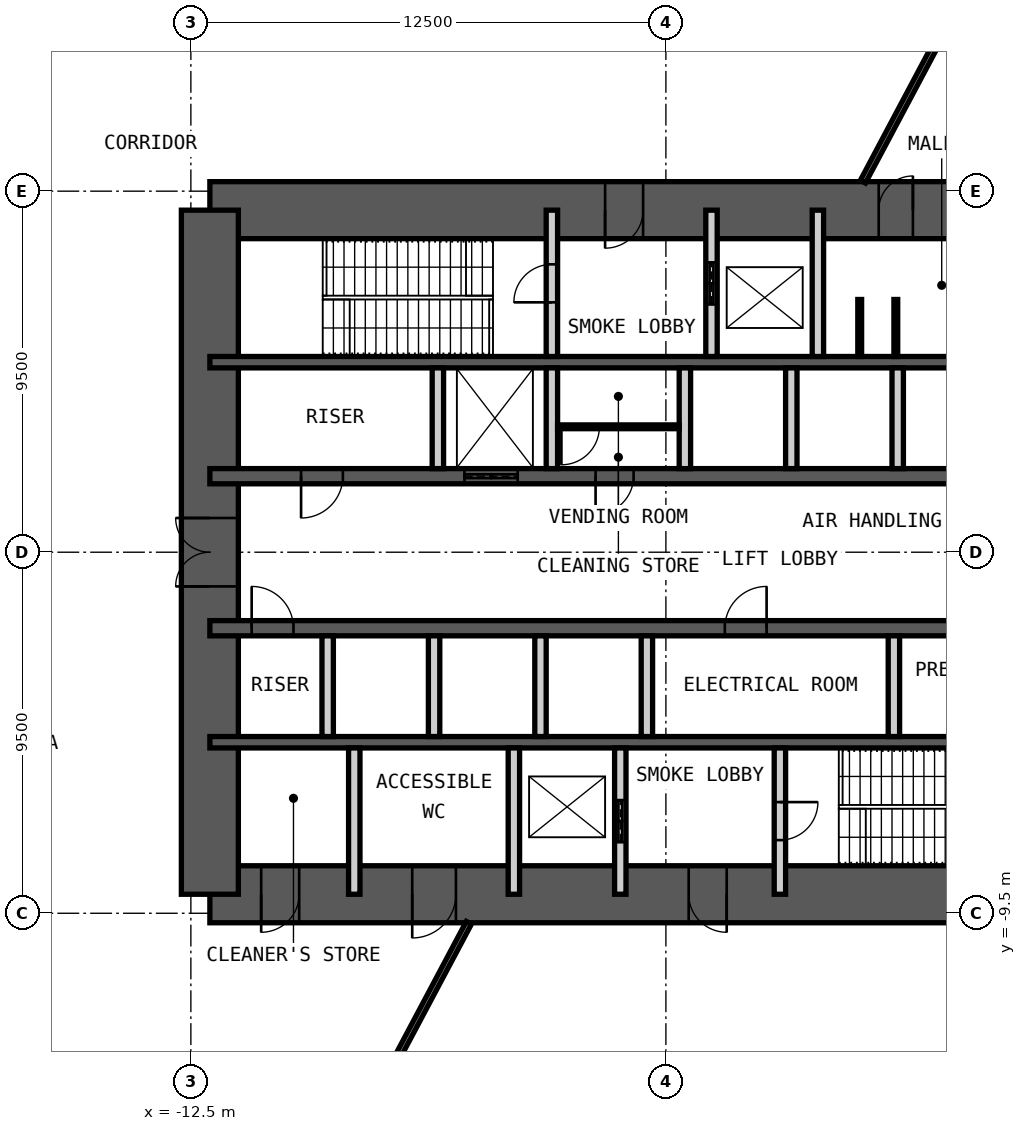
"""IFC4 building model, lengths in metres.
Left out: names, types, materials, properties, quantities, classifications, styles, units other than length and angle.
Written with IfcOpenShell. Run it as: python <this file> out.ifc"""

import sys

from ifc_helpers import new_model, si_unit, direction, frame, frame_2d, origin, place, context, subcontext, project, spatial, rectangle, extrude, element, fill, save


model = new_model("IFC4")
c1 = context("Model", 3, precision=1e-05, world=origin(), true_north=direction((0.0, 1.0)))
c2 = subcontext(c1, "Body", "Model", "MODEL_VIEW")
j1 = project(units=[si_unit("LENGTHUNIT", "METRE"), si_unit("PLANEANGLEUNIT", "RADIAN")], contexts=[c1])
p1 = place(None, origin())
s1 = spatial("IfcSite", under=j1, at=p1, CompositionType="ELEMENT")
p2 = place(p1, origin())
s2 = spatial("IfcBuilding", under=s1, at=p2, CompositionType="ELEMENT")
p3 = place(p2, frame((0.0, 0.0, -6.0)))
s3 = spatial("IfcBuildingStorey", under=s2, at=p3, CompositionType="ELEMENT", Elevation=-6.0)
p4 = place(p3, frame((-12.0, 9.0, 0.0), z_axis=(0.0, 0.0, 1.0), x_axis=(1.0, 0.0, 0.0)))
e1 = element("IfcWall", 1, at=p4, inside=s3, PredefinedType="SHEAR", context=c2, shape_type="SweptSolid", body=[
    extrude(rectangle(XDim=24.0, YDim=1.5, at=frame_2d((12.0, 0.0))), origin(), (0.0, 0.0, 1.0), 6.0),
])
p5 = place(p4, frame((10.4, 0.0, 0.0)))
e2 = element("IfcOpeningElement", 2, at=p5, cuts=e1, PredefinedType="OPENING", context=c2, shape_type="SweptSolid", body=[
    extrude(rectangle(XDim=1.0, YDim=2.1, at=frame_2d((0.5, 1.05))), frame((0.0, 0.76, 0.0), z_axis=(0.0, -1.0, 0.0), x_axis=(1.0, 0.0, 0.0)), (0.0, 0.0, 1.0), 1.52),
])
p6 = place(p4, frame((17.6, 0.0, 0.0)))
e3 = element("IfcOpeningElement", 3, at=p6, cuts=e1, PredefinedType="OPENING", context=c2, shape_type="SweptSolid", body=[
    extrude(rectangle(XDim=0.9, YDim=2.1, at=frame_2d((0.45, 1.05))), frame((0.0, 0.76, 0.0), z_axis=(0.0, -1.0, 0.0), x_axis=(1.0, 0.0, 0.0)), (0.0, 0.0, 1.0), 1.52),
])
p7 = place(p4, frame((21.9, 0.0, 0.0)))
e4 = element("IfcOpeningElement", 4, at=p7, cuts=e1, PredefinedType="OPENING", context=c2, shape_type="SweptSolid", body=[
    extrude(rectangle(XDim=0.9, YDim=2.1, at=frame_2d((0.45, 1.05))), frame((0.0, 0.76, 0.0), z_axis=(0.0, -1.0, 0.0), x_axis=(1.0, 0.0, 0.0)), (0.0, 0.0, 1.0), 1.52),
])
p8 = place(p3, frame((-12.0, -9.0, 0.0), z_axis=(0.0, 0.0, 1.0), x_axis=(1.0, 0.0, 0.0)))
e5 = element("IfcWall", 5, at=p8, inside=s3, PredefinedType="SHEAR", context=c2, shape_type="SweptSolid", body=[
    extrude(rectangle(XDim=24.0, YDim=1.5, at=frame_2d((12.0, 0.0))), origin(), (0.0, 0.0, 1.0), 6.0),
])
p9 = place(p8, frame((1.35, 0.0, 0.0)))
e6 = element("IfcOpeningElement", 6, at=p9, cuts=e5, PredefinedType="OPENING", context=c2, shape_type="SweptSolid", body=[
    extrude(rectangle(XDim=1.0, YDim=2.1, at=frame_2d((0.5, 1.05))), frame((0.0, 0.76, 0.0), z_axis=(0.0, -1.0, 0.0), x_axis=(1.0, 0.0, 0.0)), (0.0, 0.0, 1.0), 1.52),
])
p10 = place(p8, frame((5.325, 0.0, 0.0)))
e7 = element("IfcOpeningElement", 7, at=p10, cuts=e5, PredefinedType="OPENING", context=c2, shape_type="SweptSolid", body=[
    extrude(rectangle(XDim=1.15, YDim=2.1, at=frame_2d((0.575, 1.05))), frame((0.0, 0.76, 0.0), z_axis=(0.0, -1.0, 0.0), x_axis=(1.0, 0.0, 0.0)), (0.0, 0.0, 1.0), 1.52),
])
p11 = place(p8, frame((12.6, 0.0, 0.0)))
e8 = element("IfcOpeningElement", 8, at=p11, cuts=e5, PredefinedType="OPENING", context=c2, shape_type="SweptSolid", body=[
    extrude(rectangle(XDim=1.0, YDim=2.1, at=frame_2d((0.5, 1.05))), frame((0.0, 0.76, 0.0), z_axis=(0.0, -1.0, 0.0), x_axis=(1.0, 0.0, 0.0)), (0.0, 0.0, 1.0), 1.52),
])
p12 = place(p3, frame((-12.0, -9.0, 0.0), z_axis=(0.0, 0.0, 1.0), x_axis=(0.0, 1.0, 0.0)))
e9 = element("IfcWall", 9, at=p12, inside=s3, PredefinedType="SHEAR", context=c2, shape_type="SweptSolid", body=[
    extrude(rectangle(XDim=18.0, YDim=1.5, at=frame_2d((9.0, 0.0))), origin(), (0.0, 0.0, 1.0), 6.0),
])
p13 = place(p12, frame((8.1, 0.0, 0.0)))
e10 = element("IfcOpeningElement", 10, at=p13, cuts=e9, PredefinedType="OPENING", context=c2, shape_type="SweptSolid", body=[
    extrude(rectangle(XDim=1.8, YDim=2.1, at=frame_2d((0.9, 1.05))), frame((0.0, 0.76, 0.0), z_axis=(0.0, -1.0, 0.0), x_axis=(1.0, 0.0, 0.0)), (0.0, 0.0, 1.0), 1.52),
])
p14 = place(p3, frame((-12.0, 5.0, 0.0), z_axis=(0.0, 0.0, 1.0), x_axis=(1.0, 0.0, 0.0)))
e11 = element("IfcWall", 11, at=p14, inside=s3, PredefinedType="SHEAR", context=c2, shape_type="SweptSolid", body=[
    extrude(rectangle(XDim=24.0, YDim=0.3, at=frame_2d((12.0, 0.0))), origin(), (0.0, 0.0, 1.0), 6.0),
])
p15 = place(p3, frame((-12.0, 2.0, 0.0), z_axis=(0.0, 0.0, 1.0), x_axis=(1.0, 0.0, 0.0)))
e12 = element("IfcWall", 12, at=p15, inside=s3, PredefinedType="SHEAR", context=c2, shape_type="SweptSolid", body=[
    extrude(rectangle(XDim=24.0, YDim=0.4, at=frame_2d((12.0, 0.0))), origin(), (0.0, 0.0, 1.0), 6.0),
])
p16 = place(p15, frame((2.4, 0.0, 0.0)))
e13 = element("IfcOpeningElement", 13, at=p16, cuts=e12, PredefinedType="OPENING", context=c2, shape_type="SweptSolid", body=[
    extrude(rectangle(XDim=1.1, YDim=2.1, at=frame_2d((0.55, 1.05))), frame((0.0, 0.21, 0.0), z_axis=(0.0, -1.0, 0.0), x_axis=(1.0, 0.0, 0.0)), (0.0, 0.0, 1.0), 0.42),
])
p17 = place(p15, frame((22.0, 0.0, 0.0)))
e14 = element("IfcOpeningElement", 14, at=p17, cuts=e12, PredefinedType="OPENING", context=c2, shape_type="SweptSolid", body=[
    extrude(rectangle(XDim=1.1, YDim=2.1, at=frame_2d((0.55, 1.05))), frame((0.0, 0.21, 0.0), z_axis=(0.0, -1.0, 0.0), x_axis=(1.0, 0.0, 0.0)), (0.0, 0.0, 1.0), 0.42),
])
p18 = place(p15, frame((10.15, 0.0, 0.0)))
e15 = element("IfcOpeningElement", 15, at=p18, cuts=e12, PredefinedType="OPENING", context=c2, shape_type="SweptSolid", body=[
    extrude(rectangle(XDim=1.0, YDim=2.1, at=frame_2d((0.5, 1.05))), frame((0.0, 0.21, 0.0), z_axis=(0.0, -1.0, 0.0), x_axis=(1.0, 0.0, 0.0)), (0.0, 0.0, 1.0), 0.42),
])
p19 = place(p15, frame((6.7, 0.0, 0.0)))
e16 = element("IfcOpeningElement", 16, at=p19, cuts=e12, PredefinedType="OPENING", context=c2, shape_type="SweptSolid", body=[
    extrude(rectangle(XDim=1.4, YDim=2.4, at=frame_2d((0.7, 1.2))), frame((0.0, 0.21, 0.0), z_axis=(0.0, -1.0, 0.0), x_axis=(1.0, 0.0, 0.0)), (0.0, 0.0, 1.0), 0.42),
])
p20 = place(p3, frame((-12.0, -2.0, 0.0), z_axis=(0.0, 0.0, 1.0), x_axis=(1.0, 0.0, 0.0)))
e17 = element("IfcWall", 17, at=p20, inside=s3, PredefinedType="SHEAR", context=c2, shape_type="SweptSolid", body=[
    extrude(rectangle(XDim=24.0, YDim=0.4, at=frame_2d((12.0, 0.0))), origin(), (0.0, 0.0, 1.0), 6.0),
])
p21 = place(p20, frame((1.1, 0.0, 0.0)))
e18 = element("IfcOpeningElement", 18, at=p21, cuts=e17, PredefinedType="OPENING", context=c2, shape_type="SweptSolid", body=[
    extrude(rectangle(XDim=1.1, YDim=2.1, at=frame_2d((0.55, 1.05))), frame((0.0, 0.21, 0.0), z_axis=(0.0, -1.0, 0.0), x_axis=(1.0, 0.0, 0.0)), (0.0, 0.0, 1.0), 0.42),
])
p22 = place(p20, frame((13.55, 0.0, 0.0)))
e19 = element("IfcOpeningElement", 19, at=p22, cuts=e17, PredefinedType="OPENING", context=c2, shape_type="SweptSolid", body=[
    extrude(rectangle(XDim=1.1, YDim=2.1, at=frame_2d((0.55, 1.05))), frame((0.0, 0.21, 0.0), z_axis=(0.0, -1.0, 0.0), x_axis=(1.0, 0.0, 0.0)), (0.0, 0.0, 1.0), 0.42),
])
p23 = place(p20, frame((20.7, 0.0, 0.0)))
e20 = element("IfcOpeningElement", 20, at=p23, cuts=e17, PredefinedType="OPENING", context=c2, shape_type="SweptSolid", body=[
    extrude(rectangle(XDim=1.1, YDim=2.1, at=frame_2d((0.55, 1.05))), frame((0.0, 0.21, 0.0), z_axis=(0.0, -1.0, 0.0), x_axis=(1.0, 0.0, 0.0)), (0.0, 0.0, 1.0), 0.42),
])
p24 = place(p3, frame((-12.0, -5.0, 0.0), z_axis=(0.0, 0.0, 1.0), x_axis=(1.0, 0.0, 0.0)))
e21 = element("IfcWall", 21, at=p24, inside=s3, PredefinedType="SHEAR", context=c2, shape_type="SweptSolid", body=[
    extrude(rectangle(XDim=24.0, YDim=0.3, at=frame_2d((12.0, 0.0))), origin(), (0.0, 0.0, 1.0), 6.0),
])
p25 = place(p3, frame((-3.0, 5.15, 0.0), z_axis=(0.0, 0.0, 1.0), x_axis=(0.0, 1.0, 0.0)))
e22 = element("IfcWall", 22, at=p25, inside=s3, PredefinedType="PARTITIONING", context=c2, shape_type="SweptSolid", body=[
    extrude(rectangle(XDim=3.85, YDim=0.3, at=frame_2d((1.925, 0.0))), origin(), (0.0, 0.0, 1.0), 5.78),
])
p26 = place(p25, frame((1.425, 0.0, 0.0)))
e23 = element("IfcOpeningElement", 23, at=p26, cuts=e22, PredefinedType="OPENING", context=c2, shape_type="SweptSolid", body=[
    extrude(rectangle(XDim=1.0, YDim=2.1, at=frame_2d((0.5, 1.05))), frame((0.0, 0.16, 0.0), z_axis=(0.0, -1.0, 0.0), x_axis=(1.0, 0.0, 0.0)), (0.0, 0.0, 1.0), 0.32),
])
p27 = place(p3, frame((1.2, 5.15, 0.0), z_axis=(0.0, 0.0, 1.0), x_axis=(0.0, 1.0, 0.0)))
e24 = element("IfcWall", 24, at=p27, inside=s3, PredefinedType="PARTITIONING", context=c2, shape_type="SweptSolid", body=[
    extrude(rectangle(XDim=3.85, YDim=0.3, at=frame_2d((1.925, 0.0))), origin(), (0.0, 0.0, 1.0), 5.78),
])
p28 = place(p27, frame((1.375, 0.0, 0.0)))
e25 = element("IfcOpeningElement", 25, at=p28, cuts=e24, PredefinedType="OPENING", context=c2, shape_type="SweptSolid", body=[
    extrude(rectangle(XDim=1.1, YDim=2.4, at=frame_2d((0.55, 1.2))), frame((0.0, 0.16, 0.0), z_axis=(0.0, -1.0, 0.0), x_axis=(1.0, 0.0, 0.0)), (0.0, 0.0, 1.0), 0.32),
])
p29 = place(p3, frame((4.0, 5.15, 0.0), z_axis=(0.0, 0.0, 1.0), x_axis=(0.0, 1.0, 0.0)))
e26 = element("IfcWall", 26, at=p29, inside=s3, PredefinedType="PARTITIONING", context=c2, shape_type="SweptSolid", body=[
    extrude(rectangle(XDim=3.85, YDim=0.3, at=frame_2d((1.925, 0.0))), origin(), (0.0, 0.0, 1.0), 5.78),
])
for number, where, z_axis, x_axis in (
    (27, (-6.0, 2.2, 0.0), (0.0, 0.0, 1.0), (0.0, 1.0, 0.0)),
    (28, (-3.0, 2.2, 0.0), (0.0, 0.0, 1.0), (0.0, 1.0, 0.0)),
    (29, (0.5, 2.2, 0.0), (0.0, 0.0, 1.0), (0.0, 1.0, 0.0)),
    (30, (3.3, 2.2, 0.0), (0.0, 0.0, 1.0), (0.0, 1.0, 0.0)),
    (31, (6.1, 2.2, 0.0), (0.0, 0.0, 1.0), (0.0, 1.0, 0.0)),
    (32, (-8.9, -4.85, 0.0), (0.0, 0.0, 1.0), (0.0, 1.0, 0.0)),
    (33, (-6.1, -4.85, 0.0), (0.0, 0.0, 1.0), (0.0, 1.0, 0.0)),
    (34, (-3.3, -4.85, 0.0), (0.0, 0.0, 1.0), (0.0, 1.0, 0.0)),
    (35, (-0.5, -4.85, 0.0), (0.0, 0.0, 1.0), (0.0, 1.0, 0.0)),
    (36, (6.0, -4.85, 0.0), (0.0, 0.0, 1.0), (0.0, 1.0, 0.0)),
):
    element("IfcWall", number, at=place(p3, frame(where, z_axis=z_axis, x_axis=x_axis)), inside=s3, PredefinedType="PARTITIONING", context=c2, shape_type="SweptSolid", body=[
        extrude(rectangle(XDim=2.65, YDim=0.3, at=frame_2d((1.325, 0.0))), origin(), (0.0, 0.0, 1.0), 5.78),
    ])
for number, where, z_axis, x_axis in (
    (37, (-8.2, -9.0, 0.0), (0.0, 0.0, 1.0), (0.0, 1.0, 0.0)),
    (38, (-4.0, -9.0, 0.0), (0.0, 0.0, 1.0), (0.0, 1.0, 0.0)),
):
    element("IfcWall", number, at=place(p3, frame(where, z_axis=z_axis, x_axis=x_axis)), inside=s3, PredefinedType="PARTITIONING", context=c2, shape_type="SweptSolid", body=[
        extrude(rectangle(XDim=3.85, YDim=0.3, at=frame_2d((1.925, 0.0))), origin(), (0.0, 0.0, 1.0), 5.78),
    ])
p30 = place(p3, frame((-1.2, -9.0, 0.0), z_axis=(0.0, 0.0, 1.0), x_axis=(0.0, 1.0, 0.0)))
e39 = element("IfcWall", 39, at=p30, inside=s3, PredefinedType="PARTITIONING", context=c2, shape_type="SweptSolid", body=[
    extrude(rectangle(XDim=3.85, YDim=0.3, at=frame_2d((1.925, 0.0))), origin(), (0.0, 0.0, 1.0), 5.78),
])
p31 = place(p30, frame((1.375, 0.0, 0.0)))
e40 = element("IfcOpeningElement", 40, at=p31, cuts=e39, PredefinedType="OPENING", context=c2, shape_type="SweptSolid", body=[
    extrude(rectangle(XDim=1.1, YDim=2.4, at=frame_2d((0.55, 1.2))), frame((0.0, 0.16, 0.0), z_axis=(0.0, -1.0, 0.0), x_axis=(1.0, 0.0, 0.0)), (0.0, 0.0, 1.0), 0.32),
])
p32 = place(p3, frame((3.0, -9.0, 0.0), z_axis=(0.0, 0.0, 1.0), x_axis=(0.0, 1.0, 0.0)))
e41 = element("IfcWall", 41, at=p32, inside=s3, PredefinedType="PARTITIONING", context=c2, shape_type="SweptSolid", body=[
    extrude(rectangle(XDim=3.85, YDim=0.3, at=frame_2d((1.925, 0.0))), origin(), (0.0, 0.0, 1.0), 5.78),
])
p33 = place(p32, frame((1.425, 0.0, 0.0)))
e42 = element("IfcOpeningElement", 42, at=p33, cuts=e41, PredefinedType="OPENING", context=c2, shape_type="SweptSolid", body=[
    extrude(rectangle(XDim=1.0, YDim=2.1, at=frame_2d((0.5, 1.05))), frame((0.0, 0.16, 0.0), z_axis=(0.0, -1.0, 0.0), x_axis=(1.0, 0.0, 0.0)), (0.0, 0.0, 1.0), 0.32),
])
p34 = place(p3, frame((-2.85, 3.3, 0.0), z_axis=(0.0, 0.0, 1.0), x_axis=(1.0, 0.0, 0.0)))
e43 = element("IfcWall", 43, at=p34, inside=s3, PredefinedType="PARTITIONING", context=c2, shape_type="SweptSolid", body=[
    extrude(rectangle(XDim=3.2, YDim=0.1, at=frame_2d((1.6, 0.0))), origin(), (0.0, 0.0, 1.0), 5.78),
])
p35 = place(p34, frame((0.1, 0.0, 0.0)))
e44 = element("IfcOpeningElement", 44, at=p35, cuts=e43, PredefinedType="OPENING", context=c2, shape_type="SweptSolid", body=[
    extrude(rectangle(XDim=1.0, YDim=2.4, at=frame_2d((0.5, 1.2))), frame((0.0, 0.06, 0.0), z_axis=(0.0, -1.0, 0.0), x_axis=(1.0, 0.0, 0.0)), (0.0, 0.0, 1.0), 0.12),
])
for number, where, z_axis, x_axis in (
    (45, (5.1, 5.15, 0.0), (0.0, 0.0, 1.0), (0.0, 1.0, 0.0)),
    (46, (6.05, 5.15, 0.0), (0.0, 0.0, 1.0), (0.0, 1.0, 0.0)),
):
    element("IfcWall", number, at=place(p3, frame(where, z_axis=z_axis, x_axis=x_axis)), inside=s3, PredefinedType="PARTITIONING", context=c2, shape_type="SweptSolid", body=[
        extrude(rectangle(XDim=1.5, YDim=0.1, at=frame_2d((0.75, 0.0))), origin(), (0.0, 0.0, 1.0), 2.1),
    ])
p36 = place(p3, frame((-16.105, -20.705, 0.0), z_axis=(0.0, 0.0, 1.0), x_axis=(-0.500004511595, 0.866022798998, 0.0)))
e47 = element("IfcWall", 47, at=p36, inside=s3, PredefinedType="PARTITIONING", context=c2, shape_type="SweptSolid", body=[
    extrude(rectangle(XDim=16.683, YDim=0.15, at=frame_2d((8.342, 0.0))), origin(), (0.0, 0.0, 1.0), 5.75),
])
p37 = place(p36, frame((7.442, 0.0, 0.0)))
e48 = element("IfcOpeningElement", 48, at=p37, cuts=e47, PredefinedType="OPENING", context=c2, shape_type="SweptSolid", body=[
    extrude(rectangle(XDim=1.8, YDim=2.4, at=frame_2d((0.9, 1.2))), frame((0.0, 0.085, 0.0), z_axis=(0.0, -1.0, 0.0), x_axis=(1.0, 0.0, 0.0)), (0.0, 0.0, 1.0), 0.17),
])
p38 = place(p3, frame((5.184, 9.75, 0.0), z_axis=(0.0, 0.0, 1.0), x_axis=(0.469471208528, 0.882947781221, 0.0)))
e49 = element("IfcWall", 49, at=p38, inside=s3, PredefinedType="PARTITIONING", context=c2, shape_type="SweptSolid", body=[
    extrude(rectangle(XDim=26.134, YDim=0.15, at=frame_2d((13.067, 0.0))), origin(), (0.0, 0.0, 1.0), 5.75),
])
p39 = place(p38, frame((12.167, 0.0, 0.0)))
e50 = element("IfcOpeningElement", 50, at=p39, cuts=e49, PredefinedType="OPENING", context=c2, shape_type="SweptSolid", body=[
    extrude(rectangle(XDim=1.8, YDim=2.4, at=frame_2d((0.9, 1.2))), frame((0.0, 0.085, 0.0), z_axis=(0.0, -1.0, 0.0), x_axis=(1.0, 0.0, 0.0)), (0.0, 0.0, 1.0), 0.17),
])
p40 = place(p3, frame((-5.184, -9.75, 0.0), z_axis=(0.0, 0.0, 1.0), x_axis=(-0.469470342993, -0.882948241433, 0.0)))
e51 = element("IfcWall", 51, at=p40, inside=s3, PredefinedType="PARTITIONING", context=c2, shape_type="SweptSolid", body=[
    extrude(rectangle(XDim=27.565, YDim=0.15, at=frame_2d((13.783, 0.0))), origin(), (0.0, 0.0, 1.0), 5.75),
])
p41 = place(p40, frame((12.883, 0.0, 0.0)))
e52 = element("IfcOpeningElement", 52, at=p41, cuts=e51, PredefinedType="OPENING", context=c2, shape_type="SweptSolid", body=[
    extrude(rectangle(XDim=1.8, YDim=2.4, at=frame_2d((0.9, 1.2))), frame((0.0, 0.085, 0.0), z_axis=(0.0, -1.0, 0.0), x_axis=(1.0, 0.0, 0.0)), (0.0, 0.0, 1.0), 0.17),
])
p42 = place(p5, origin())
e53 = element("IfcDoor", 53, at=p42, inside=s3, OperationType="SINGLE_SWING_LEFT", PredefinedType="DOOR", context=c2, shape_type="SweptSolid", body=[
    extrude(rectangle(XDim=1.0, YDim=2.1, at=frame_2d((0.5, 1.05))), frame((0.0, 0.025, 0.0), z_axis=(0.0, -1.0, 0.0), x_axis=(1.0, 0.0, 0.0)), (0.0, 0.0, 1.0), 0.05),
])
fill(e2, e53)
p43 = place(p6, origin())
e54 = element("IfcDoor", 54, at=p43, inside=s3, OperationType="SINGLE_SWING_LEFT", PredefinedType="DOOR", context=c2, shape_type="SweptSolid", body=[
    extrude(rectangle(XDim=0.9, YDim=2.1, at=frame_2d((0.45, 1.05))), frame((0.0, 0.025, 0.0), z_axis=(0.0, -1.0, 0.0), x_axis=(1.0, 0.0, 0.0)), (0.0, 0.0, 1.0), 0.05),
])
fill(e3, e54)
p44 = place(p9, origin())
e55 = element("IfcDoor", 55, at=p44, inside=s3, OperationType="SINGLE_SWING_LEFT", PredefinedType="DOOR", context=c2, shape_type="SweptSolid", body=[
    extrude(rectangle(XDim=1.0, YDim=2.1, at=frame_2d((0.5, 1.05))), frame((0.0, 0.025, 0.0), z_axis=(0.0, -1.0, 0.0), x_axis=(1.0, 0.0, 0.0)), (0.0, 0.0, 1.0), 0.05),
])
fill(e6, e55)
p45 = place(p10, origin())
e56 = element("IfcDoor", 56, at=p45, inside=s3, OperationType="SINGLE_SWING_LEFT", PredefinedType="DOOR", context=c2, shape_type="SweptSolid", body=[
    extrude(rectangle(XDim=1.15, YDim=2.1, at=frame_2d((0.575, 1.05))), frame((0.0, 0.025, 0.0), z_axis=(0.0, -1.0, 0.0), x_axis=(1.0, 0.0, 0.0)), (0.0, 0.0, 1.0), 0.05),
])
fill(e7, e56)
p46 = place(p11, origin())
e57 = element("IfcDoor", 57, at=p46, inside=s3, OperationType="SINGLE_SWING_RIGHT", PredefinedType="DOOR", context=c2, shape_type="SweptSolid", body=[
    extrude(rectangle(XDim=1.0, YDim=2.1, at=frame_2d((0.5, 1.05))), frame((0.0, 0.025, 0.0), z_axis=(0.0, -1.0, 0.0), x_axis=(1.0, 0.0, 0.0)), (0.0, 0.0, 1.0), 0.05),
])
fill(e8, e57)
p47 = place(p26, origin())
e58 = element("IfcDoor", 58, at=p47, inside=s3, OperationType="SINGLE_SWING_RIGHT", PredefinedType="DOOR", context=c2, shape_type="SweptSolid", body=[
    extrude(rectangle(XDim=1.0, YDim=2.1, at=frame_2d((0.5, 1.05))), frame((0.0, 0.025, 0.0), z_axis=(0.0, -1.0, 0.0), x_axis=(1.0, 0.0, 0.0)), (0.0, 0.0, 1.0), 0.05),
])
fill(e23, e58)
p48 = place(p33, origin())
e59 = element("IfcDoor", 59, at=p48, inside=s3, OperationType="SINGLE_SWING_RIGHT", PredefinedType="DOOR", context=c2, shape_type="SweptSolid", body=[
    extrude(rectangle(XDim=1.0, YDim=2.1, at=frame_2d((0.5, 1.05))), frame((0.0, 0.025, 0.0), z_axis=(0.0, -1.0, 0.0), x_axis=(1.0, 0.0, 0.0)), (0.0, 0.0, 1.0), 0.05),
])
fill(e42, e59)
p49 = place(p16, origin())
e60 = element("IfcDoor", 60, at=p49, inside=s3, OperationType="SINGLE_SWING_LEFT", PredefinedType="DOOR", context=c2, shape_type="SweptSolid", body=[
    extrude(rectangle(XDim=1.1, YDim=2.1, at=frame_2d((0.55, 1.05))), frame((0.0, 0.025, 0.0), z_axis=(0.0, -1.0, 0.0), x_axis=(1.0, 0.0, 0.0)), (0.0, 0.0, 1.0), 0.05),
])
fill(e13, e60)
p50 = place(p21, origin())
e61 = element("IfcDoor", 61, at=p50, inside=s3, OperationType="SINGLE_SWING_RIGHT", PredefinedType="DOOR", context=c2, shape_type="SweptSolid", body=[
    extrude(rectangle(XDim=1.1, YDim=2.1, at=frame_2d((0.55, 1.05))), frame((0.0, 0.025, 0.0), z_axis=(0.0, -1.0, 0.0), x_axis=(1.0, 0.0, 0.0)), (0.0, 0.0, 1.0), 0.05),
])
fill(e18, e61)
p51 = place(p18, origin())
e62 = element("IfcDoor", 62, at=p51, inside=s3, OperationType="SINGLE_SWING_LEFT", PredefinedType="DOOR", context=c2, shape_type="SweptSolid", body=[
    extrude(rectangle(XDim=1.0, YDim=2.1, at=frame_2d((0.5, 1.05))), frame((0.0, 0.025, 0.0), z_axis=(0.0, -1.0, 0.0), x_axis=(1.0, 0.0, 0.0)), (0.0, 0.0, 1.0), 0.05),
])
fill(e15, e62)
p52 = place(p22, origin())
e63 = element("IfcDoor", 63, at=p52, inside=s3, OperationType="SINGLE_SWING_LEFT", PredefinedType="DOOR", context=c2, shape_type="SweptSolid", body=[
    extrude(rectangle(XDim=1.1, YDim=2.1, at=frame_2d((0.55, 1.05))), frame((0.0, 0.025, 0.0), z_axis=(0.0, -1.0, 0.0), x_axis=(1.0, 0.0, 0.0)), (0.0, 0.0, 1.0), 0.05),
])
fill(e19, e63)
p53 = place(p13, origin())
e64 = element("IfcDoor", 64, at=p53, inside=s3, OperationType="DOUBLE_DOOR_DOUBLE_SWING", PredefinedType="DOOR", context=c2, shape_type="SweptSolid", body=[
    extrude(rectangle(XDim=1.8, YDim=2.1, at=frame_2d((0.9, 1.05))), frame((0.0, 0.025, 0.0), z_axis=(0.0, -1.0, 0.0), x_axis=(1.0, 0.0, 0.0)), (0.0, 0.0, 1.0), 0.05),
])
fill(e10, e64)
p54 = place(p28, origin())
e65 = element("IfcDoor", 65, at=p54, inside=s3, OperationType="DOUBLE_DOOR_SLIDING", PredefinedType="DOOR", context=c2, shape_type="SweptSolid", body=[
    extrude(rectangle(XDim=1.1, YDim=2.4, at=frame_2d((0.55, 1.2))), frame((0.0, 0.025, 0.0), z_axis=(0.0, -1.0, 0.0), x_axis=(1.0, 0.0, 0.0)), (0.0, 0.0, 1.0), 0.05),
])
fill(e25, e65)
p55 = place(p31, origin())
e66 = element("IfcDoor", 66, at=p55, inside=s3, OperationType="DOUBLE_DOOR_SLIDING", PredefinedType="DOOR", context=c2, shape_type="SweptSolid", body=[
    extrude(rectangle(XDim=1.1, YDim=2.4, at=frame_2d((0.55, 1.2))), frame((0.0, 0.025, 0.0), z_axis=(0.0, -1.0, 0.0), x_axis=(1.0, 0.0, 0.0)), (0.0, 0.0, 1.0), 0.05),
])
fill(e40, e66)
p56 = place(p19, origin())
e67 = element("IfcDoor", 67, at=p56, inside=s3, OperationType="DOUBLE_DOOR_SLIDING", PredefinedType="DOOR", context=c2, shape_type="SweptSolid", body=[
    extrude(rectangle(XDim=1.4, YDim=2.4, at=frame_2d((0.7, 1.2))), frame((0.0, 0.025, 0.0), z_axis=(0.0, -1.0, 0.0), x_axis=(1.0, 0.0, 0.0)), (0.0, 0.0, 1.0), 0.05),
])
fill(e16, e67)
p57 = place(p35, origin())
e68 = element("IfcDoor", 68, at=p57, inside=s3, OperationType="SINGLE_SWING_LEFT", PredefinedType="DOOR", context=c2, shape_type="SweptSolid", body=[
    extrude(rectangle(XDim=1.0, YDim=2.4, at=frame_2d((0.5, 1.2))), frame((0.0, 0.025, 0.0), z_axis=(0.0, -1.0, 0.0), x_axis=(1.0, 0.0, 0.0)), (0.0, 0.0, 1.0), 0.05),
])
fill(e44, e68)
save(model, sys.argv[1])
